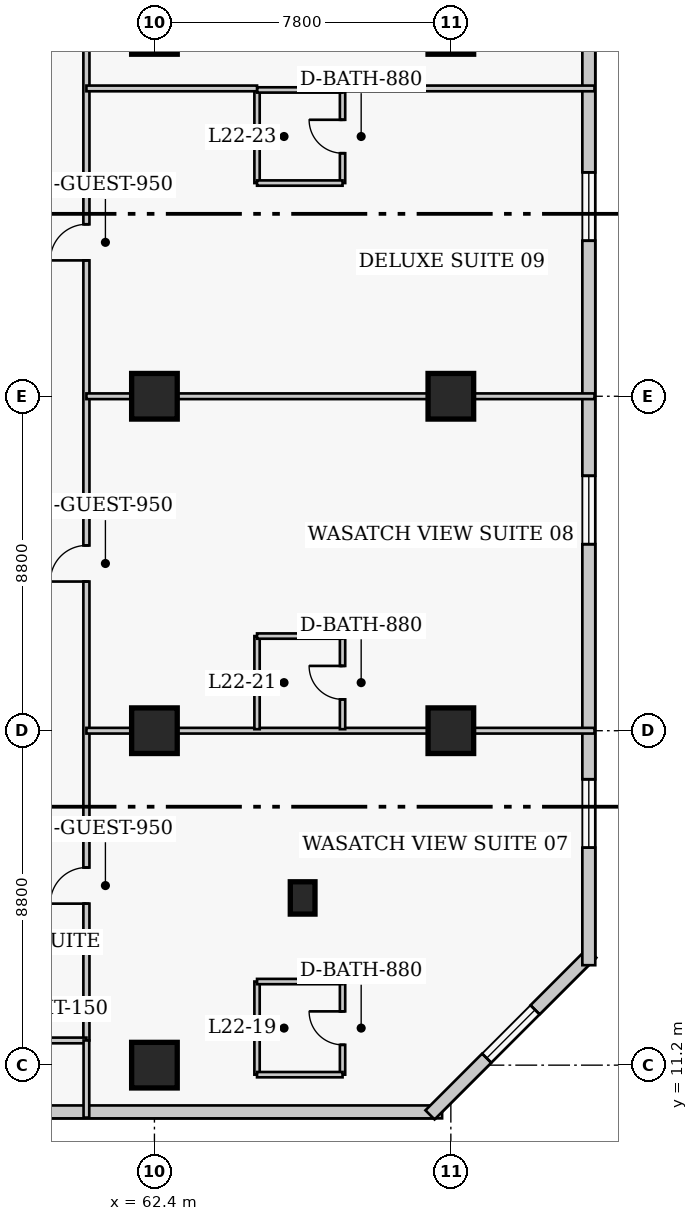
"""IFC4 building model, lengths in metres.
Left out: names, types, materials, properties, quantities, classifications, styles, units other than length and angle.
Written with IfcOpenShell. Run it as: python <this file> out.ifc"""

import sys

from ifc_helpers import new_model, si_unit, direction, frame, frame_2d, origin, origin_2d, place, context, subcontext, project, spatial, rectangle, extrude, element, fill, save


model = new_model("IFC4")
c1 = context("Model", 3, precision=1e-05, world=origin(), true_north=direction((0.0, 1.0)))
c2 = subcontext(c1, "Body", "Model", "MODEL_VIEW")
j1 = project(units=[si_unit("LENGTHUNIT", "METRE"), si_unit("PLANEANGLEUNIT", "RADIAN")], contexts=[c1])
p1 = place(None, origin())
s1 = spatial("IfcSite", under=j1, at=p1, CompositionType="ELEMENT")
p2 = place(p1, origin())
s2 = spatial("IfcBuilding", under=s1, at=p2, CompositionType="ELEMENT")
p3 = place(p2, frame((0.0, 0.0, 91.8)))
s3 = spatial("IfcBuildingStorey", under=s2, at=p3, CompositionType="ELEMENT", Elevation=91.8)
for number, where, z_axis, x_axis in (
    (1, (62.4, 11.2, 0.0), (0.0, 0.0, 1.0), (1.0, 0.0, 0.0)),
    (2, (62.4, 20.0, 0.0), (0.0, 0.0, 1.0), (1.0, 0.0, 0.0)),
    (3, (62.4, 28.8, 0.0), (0.0, 0.0, 1.0), (1.0, 0.0, 0.0)),
    (4, (62.4, 38.4, 0.0), (0.0, 0.0, 1.0), (1.0, 0.0, 0.0)),
    (5, (70.2, 20.0, 0.0), (0.0, 0.0, 1.0), (1.0, 0.0, 0.0)),
    (6, (70.2, 28.8, 0.0), (0.0, 0.0, 1.0), (1.0, 0.0, 0.0)),
    (7, (70.2, 38.4, 0.0), (0.0, 0.0, 1.0), (1.0, 0.0, 0.0)),
):
    element("IfcColumn", number, at=place(p3, frame(where, z_axis=z_axis, x_axis=x_axis)), inside=s3, PredefinedType="COLUMN", context=c2, shape_type="SweptSolid", body=[
        extrude(rectangle(XDim=1.2, YDim=1.2, at=origin_2d()), origin(), (0.0, 0.0, 1.0), 3.8),
    ])
p4 = place(p3, frame((66.3, 15.6, 0.0), z_axis=(0.0, 0.0, 1.0), x_axis=(1.0, 0.0, 0.0)))
e8 = element("IfcColumn", 8, at=p4, inside=s3, PredefinedType="PILASTER", context=c2, shape_type="SweptSolid", body=[
    extrude(rectangle(XDim=0.65, YDim=0.85, at=origin_2d()), origin(), (0.0, 0.0, 1.0), 3.8),
])
p5 = place(p3, frame((41.68, 9.97, 0.0), z_axis=(0.0, 0.0, 1.0), x_axis=(1.0, 0.0, 0.0)))
e9 = element("IfcWall", 9, at=p5, inside=s3, PredefinedType="SOLIDWALL", context=c2, shape_type="SweptSolid", body=[
    extrude(rectangle(XDim=28.29, YDim=0.34, at=frame_2d((14.145, 0.0))), origin(), (0.0, 0.0, 1.0), 3.54),
])
p6 = place(p5, frame((7.57, 0.0, 0.0)))
e10 = element("IfcOpeningElement", 10, at=p6, cuts=e9, PredefinedType="OPENING", context=c2, shape_type="SweptSolid", body=[
    extrude(rectangle(XDim=1.4, YDim=2.15, at=frame_2d((0.7, 1.075))), frame((0.0, 0.18, 0.0), z_axis=(0.0, -1.0, 0.0), x_axis=(1.0, 0.0, 0.0)), (0.0, 0.0, 1.0), 0.36),
])
p7 = place(p5, frame((2.665, 0.0, 0.85)))
e11 = element("IfcOpeningElement", 11, at=p7, cuts=e9, PredefinedType="OPENING", context=c2, shape_type="SweptSolid", body=[
    extrude(rectangle(XDim=1.8, YDim=1.8, at=frame_2d((0.9, 0.9))), frame((0.0, 0.18, 0.0), z_axis=(0.0, -1.0, 0.0), x_axis=(1.0, 0.0, 0.0)), (0.0, 0.0, 1.0), 0.36),
])
p8 = place(p5, frame((13.895, 0.0, 0.85)))
e12 = element("IfcOpeningElement", 12, at=p8, cuts=e9, PredefinedType="OPENING", context=c2, shape_type="SweptSolid", body=[
    extrude(rectangle(XDim=1.8, YDim=1.8, at=frame_2d((0.9, 0.9))), frame((0.0, 0.18, 0.0), z_axis=(0.0, -1.0, 0.0), x_axis=(1.0, 0.0, 0.0)), (0.0, 0.0, 1.0), 0.36),
])
p9 = place(p3, frame((69.652, 9.892, 0.0), z_axis=(0.0, 0.0, 1.0), x_axis=(0.707106781187, 0.707106781187, 0.0)))
e13 = element("IfcWall", 13, at=p9, inside=s3, PredefinedType="SOLIDWALL", context=c2, shape_type="SweptSolid", body=[
    extrude(rectangle(XDim=6.02, YDim=0.34, at=frame_2d((3.01, 0.0))), origin(), (0.0, 0.0, 1.0), 3.54),
])
p10 = place(p9, frame((2.11, 0.0, 0.85)))
e14 = element("IfcOpeningElement", 14, at=p10, cuts=e13, PredefinedType="OPENING", context=c2, shape_type="SweptSolid", body=[
    extrude(rectangle(XDim=1.8, YDim=1.8, at=frame_2d((0.9, 0.9))), frame((0.0, 0.18, 0.0), z_axis=(0.0, -1.0, 0.0), x_axis=(1.0, 0.0, 0.0)), (0.0, 0.0, 1.0), 0.36),
])
p11 = place(p3, frame((73.83, 13.83, 0.0), z_axis=(0.0, 0.0, 1.0), x_axis=(0.0, 1.0, 0.0)))
e15 = element("IfcWall", 15, at=p11, inside=s3, PredefinedType="SOLIDWALL", context=c2, shape_type="SweptSolid", body=[
    extrude(rectangle(XDim=31.94, YDim=0.34, at=frame_2d((15.97, 0.0))), origin(), (0.0, 0.0, 1.0), 3.54),
])
p12 = place(p11, frame((3.093, 0.0, 0.85)))
e16 = element("IfcOpeningElement", 16, at=p12, cuts=e15, PredefinedType="OPENING", context=c2, shape_type="SweptSolid", body=[
    extrude(rectangle(XDim=1.8, YDim=1.8, at=frame_2d((0.9, 0.9))), frame((0.0, 0.18, 0.0), z_axis=(0.0, -1.0, 0.0), x_axis=(1.0, 0.0, 0.0)), (0.0, 0.0, 1.0), 0.36),
])
p13 = place(p11, frame((11.077, 0.0, 0.85)))
e17 = element("IfcOpeningElement", 17, at=p13, cuts=e15, PredefinedType="OPENING", context=c2, shape_type="SweptSolid", body=[
    extrude(rectangle(XDim=1.8, YDim=1.8, at=frame_2d((0.9, 0.9))), frame((0.0, 0.18, 0.0), z_axis=(0.0, -1.0, 0.0), x_axis=(1.0, 0.0, 0.0)), (0.0, 0.0, 1.0), 0.36),
])
p14 = place(p11, frame((19.062, 0.0, 0.85)))
e18 = element("IfcOpeningElement", 18, at=p14, cuts=e15, PredefinedType="OPENING", context=c2, shape_type="SweptSolid", body=[
    extrude(rectangle(XDim=1.8, YDim=1.8, at=frame_2d((0.9, 0.9))), frame((0.0, 0.18, 0.0), z_axis=(0.0, -1.0, 0.0), x_axis=(1.0, 0.0, 0.0)), (0.0, 0.0, 1.0), 0.36),
])
p15 = place(p11, frame((27.048, 0.0, 0.85)))
e19 = element("IfcOpeningElement", 19, at=p15, cuts=e15, PredefinedType="OPENING", context=c2, shape_type="SweptSolid", body=[
    extrude(rectangle(XDim=1.8, YDim=1.8, at=frame_2d((0.9, 0.9))), frame((0.0, 0.18, 0.0), z_axis=(0.0, -1.0, 0.0), x_axis=(1.0, 0.0, 0.0)), (0.0, 0.0, 1.0), 0.36),
])
p16 = place(p3, frame((60.61, 11.85, 0.0), z_axis=(0.0, 0.0, 1.0), x_axis=(0.0, 1.0, 0.0)))
e20 = element("IfcWall", 20, at=p16, inside=s3, PredefinedType="PARTITIONING", context=c2, shape_type="SweptSolid", body=[
    extrude(rectangle(XDim=28.8, YDim=0.16, at=frame_2d((14.4, 0.0))), origin(), (0.0, 0.0, 1.0), 3.54),
])
p17 = place(p16, frame((3.6, 0.0, 0.0)))
e21 = element("IfcOpeningElement", 21, at=p17, cuts=e20, PredefinedType="OPENING", context=c2, shape_type="SweptSolid", body=[
    extrude(rectangle(XDim=0.95, YDim=2.1, at=frame_2d((0.475, 1.05))), frame((0.0, 0.09, 0.0), z_axis=(0.0, -1.0, 0.0), x_axis=(1.0, 0.0, 0.0)), (0.0, 0.0, 1.0), 0.18),
])
p18 = place(p16, frame((12.075, 0.0, 0.0)))
e22 = element("IfcOpeningElement", 22, at=p18, cuts=e20, PredefinedType="OPENING", context=c2, shape_type="SweptSolid", body=[
    extrude(rectangle(XDim=0.95, YDim=2.1, at=frame_2d((0.475, 1.05))), frame((0.0, 0.09, 0.0), z_axis=(0.0, -1.0, 0.0), x_axis=(1.0, 0.0, 0.0)), (0.0, 0.0, 1.0), 0.18),
])
p19 = place(p16, frame((20.525, 0.0, 0.0)))
e23 = element("IfcOpeningElement", 23, at=p19, cuts=e20, PredefinedType="OPENING", context=c2, shape_type="SweptSolid", body=[
    extrude(rectangle(XDim=0.95, YDim=2.1, at=frame_2d((0.475, 1.05))), frame((0.0, 0.09, 0.0), z_axis=(0.0, -1.0, 0.0), x_axis=(1.0, 0.0, 0.0)), (0.0, 0.0, 1.0), 0.18),
])
p20 = place(p16, frame((27.36, 0.0, 0.0)))
e24 = element("IfcOpeningElement", 24, at=p20, cuts=e20, PredefinedType="OPENING", context=c2, shape_type="SweptSolid", body=[
    extrude(rectangle(XDim=1.0, YDim=2.15, at=frame_2d((0.5, 1.075))), frame((0.0, 0.09, 0.0), z_axis=(0.0, -1.0, 0.0), x_axis=(1.0, 0.0, 0.0)), (0.0, 0.0, 1.0), 0.18),
])
p21 = place(p3, frame((58.39, 11.85, 0.0), z_axis=(0.0, 0.0, 1.0), x_axis=(1.0, 0.0, 0.0)))
e25 = element("IfcWall", 25, at=p21, inside=s3, PredefinedType="PARTITIONING", context=c2, shape_type="SweptSolid", body=[
    extrude(rectangle(XDim=2.22, YDim=0.15, at=frame_2d((1.11, 0.0))), origin(), (0.0, 0.0, 1.0), 3.54),
])
p22 = place(p3, frame((60.61, 9.82, 0.0), z_axis=(0.0, 0.0, 1.0), x_axis=(0.0, 1.0, 0.0)))
e26 = element("IfcWall", 26, at=p22, inside=s3, PredefinedType="PARTITIONING", context=c2, shape_type="SweptSolid", body=[
    extrude(rectangle(XDim=2.03, YDim=0.15, at=frame_2d((1.015, 0.0))), origin(), (0.0, 0.0, 1.0), 3.54),
])
p23 = place(p3, frame((65.1, 10.95, 0.0), z_axis=(0.0, 0.0, 1.0), x_axis=(0.0, 1.0, 0.0)))
e27 = element("IfcWall", 27, at=p23, inside=s3, PredefinedType="PLUMBINGWALL", context=c2, shape_type="SweptSolid", body=[
    extrude(rectangle(XDim=2.45, YDim=0.14, at=frame_2d((1.225, 0.0))), origin(), (0.0, 0.0, 1.0), 3.54),
])
p24 = place(p3, frame((67.35, 10.95, 0.0), z_axis=(0.0, 0.0, 1.0), x_axis=(0.0, 1.0, 0.0)))
e28 = element("IfcWall", 28, at=p24, inside=s3, PredefinedType="PLUMBINGWALL", context=c2, shape_type="SweptSolid", body=[
    extrude(rectangle(XDim=2.45, YDim=0.14, at=frame_2d((1.225, 0.0))), origin(), (0.0, 0.0, 1.0), 3.54),
])
p25 = place(p24, frame((0.785, 0.0, 0.0)))
e29 = element("IfcOpeningElement", 29, at=p25, cuts=e28, PredefinedType="OPENING", context=c2, shape_type="SweptSolid", body=[
    extrude(rectangle(XDim=0.88, YDim=2.05, at=frame_2d((0.44, 1.025))), frame((0.0, 0.08, 0.0), z_axis=(0.0, -1.0, 0.0), x_axis=(1.0, 0.0, 0.0)), (0.0, 0.0, 1.0), 0.16),
])
for number, where, z_axis, x_axis in (
    (30, (65.1, 10.95, 0.0), (0.0, 0.0, 1.0), (1.0, 0.0, 0.0)),
    (31, (65.1, 13.4, 0.0), (0.0, 0.0, 1.0), (1.0, 0.0, 0.0)),
):
    element("IfcWall", number, at=place(p3, frame(where, z_axis=z_axis, x_axis=x_axis)), inside=s3, PredefinedType="PLUMBINGWALL", context=c2, shape_type="SweptSolid", body=[
        extrude(rectangle(XDim=2.25, YDim=0.14, at=frame_2d((1.125, 0.0))), origin(), (0.0, 0.0, 1.0), 3.54),
    ])
p26 = place(p3, frame((60.61, 20.0, 0.0), z_axis=(0.0, 0.0, 1.0), x_axis=(1.0, 0.0, 0.0)))
e32 = element("IfcWall", 32, at=p26, inside=s3, PredefinedType="PARTITIONING", context=c2, shape_type="SweptSolid", body=[
    extrude(rectangle(XDim=13.37, YDim=0.15, at=frame_2d((6.685, 0.0))), origin(), (0.0, 0.0, 1.0), 2.679),
])
p27 = place(p3, frame((65.1, 20.04, 0.0), z_axis=(0.0, 0.0, 1.0), x_axis=(0.0, 1.0, 0.0)))
e33 = element("IfcWall", 33, at=p27, inside=s3, PredefinedType="PLUMBINGWALL", context=c2, shape_type="SweptSolid", body=[
    extrude(rectangle(XDim=2.45, YDim=0.14, at=frame_2d((1.225, 0.0))), origin(), (0.0, 0.0, 1.0), 3.54),
])
p28 = place(p3, frame((67.35, 20.04, 0.0), z_axis=(0.0, 0.0, 1.0), x_axis=(0.0, 1.0, 0.0)))
e34 = element("IfcWall", 34, at=p28, inside=s3, PredefinedType="PLUMBINGWALL", context=c2, shape_type="SweptSolid", body=[
    extrude(rectangle(XDim=2.45, YDim=0.14, at=frame_2d((1.225, 0.0))), origin(), (0.0, 0.0, 1.0), 3.54),
])
p29 = place(p28, frame((0.785, 0.0, 0.0)))
e35 = element("IfcOpeningElement", 35, at=p29, cuts=e34, PredefinedType="OPENING", context=c2, shape_type="SweptSolid", body=[
    extrude(rectangle(XDim=0.88, YDim=2.05, at=frame_2d((0.44, 1.025))), frame((0.0, 0.08, 0.0), z_axis=(0.0, -1.0, 0.0), x_axis=(1.0, 0.0, 0.0)), (0.0, 0.0, 1.0), 0.16),
])
p30 = place(p3, frame((65.1, 22.49, 0.0), z_axis=(0.0, 0.0, 1.0), x_axis=(1.0, 0.0, 0.0)))
e36 = element("IfcWall", 36, at=p30, inside=s3, PredefinedType="PLUMBINGWALL", context=c2, shape_type="SweptSolid", body=[
    extrude(rectangle(XDim=2.25, YDim=0.14, at=frame_2d((1.125, 0.0))), origin(), (0.0, 0.0, 1.0), 3.54),
])
p31 = place(p3, frame((60.61, 28.8, 0.0), z_axis=(0.0, 0.0, 1.0), x_axis=(1.0, 0.0, 0.0)))
e37 = element("IfcWall", 37, at=p31, inside=s3, PredefinedType="PARTITIONING", context=c2, shape_type="SweptSolid", body=[
    extrude(rectangle(XDim=13.37, YDim=0.15, at=frame_2d((6.685, 0.0))), origin(), (0.0, 0.0, 1.0), 2.679),
])
p32 = place(p3, frame((65.1, 34.41, 0.0), z_axis=(0.0, 0.0, 1.0), x_axis=(0.0, 1.0, 0.0)))
e38 = element("IfcWall", 38, at=p32, inside=s3, PredefinedType="PLUMBINGWALL", context=c2, shape_type="SweptSolid", body=[
    extrude(rectangle(XDim=2.45, YDim=0.14, at=frame_2d((1.225, 0.0))), origin(), (0.0, 0.0, 1.0), 3.54),
])
p33 = place(p3, frame((67.35, 34.41, 0.0), z_axis=(0.0, 0.0, 1.0), x_axis=(0.0, 1.0, 0.0)))
e39 = element("IfcWall", 39, at=p33, inside=s3, PredefinedType="PLUMBINGWALL", context=c2, shape_type="SweptSolid", body=[
    extrude(rectangle(XDim=2.45, YDim=0.14, at=frame_2d((1.225, 0.0))), origin(), (0.0, 0.0, 1.0), 3.54),
])
p34 = place(p33, frame((0.785, 0.0, 0.0)))
e40 = element("IfcOpeningElement", 40, at=p34, cuts=e39, PredefinedType="OPENING", context=c2, shape_type="SweptSolid", body=[
    extrude(rectangle(XDim=0.88, YDim=2.05, at=frame_2d((0.44, 1.025))), frame((0.0, 0.08, 0.0), z_axis=(0.0, -1.0, 0.0), x_axis=(1.0, 0.0, 0.0)), (0.0, 0.0, 1.0), 0.16),
])
for number, where, z_axis, x_axis in (
    (41, (65.1, 34.41, 0.0), (0.0, 0.0, 1.0), (1.0, 0.0, 0.0)),
    (42, (65.1, 36.86, 0.0), (0.0, 0.0, 1.0), (1.0, 0.0, 0.0)),
):
    element("IfcWall", number, at=place(p3, frame(where, z_axis=z_axis, x_axis=x_axis)), inside=s3, PredefinedType="PLUMBINGWALL", context=c2, shape_type="SweptSolid", body=[
        extrude(rectangle(XDim=2.25, YDim=0.14, at=frame_2d((1.125, 0.0))), origin(), (0.0, 0.0, 1.0), 3.54),
    ])
p35 = place(p3, frame((60.61, 36.9, 0.0), z_axis=(0.0, 0.0, 1.0), x_axis=(1.0, 0.0, 0.0)))
e43 = element("IfcWall", 43, at=p35, inside=s3, PredefinedType="PARTITIONING", context=c2, shape_type="SweptSolid", body=[
    extrude(rectangle(XDim=4.49, YDim=0.15, at=frame_2d((2.245, 0.0))), origin(), (0.0, 0.0, 1.0), 3.54),
])
p36 = place(p3, frame((67.35, 36.9, 0.0), z_axis=(0.0, 0.0, 1.0), x_axis=(1.0, 0.0, 0.0)))
e44 = element("IfcWall", 44, at=p36, inside=s3, PredefinedType="PARTITIONING", context=c2, shape_type="SweptSolid", body=[
    extrude(rectangle(XDim=6.63, YDim=0.15, at=frame_2d((3.315, 0.0))), origin(), (0.0, 0.0, 1.0), 3.54),
])
p37 = place(p10, origin())
e45 = element("IfcWindow", 45, at=p37, inside=s3, PartitioningType="SINGLE_PANEL", PredefinedType="WINDOW", context=c2, shape_type="SweptSolid", body=[
    extrude(rectangle(XDim=1.8, YDim=1.8, at=frame_2d((0.9, 0.9))), frame((0.0, 0.03, 0.0), z_axis=(0.0, -1.0, 0.0), x_axis=(1.0, 0.0, 0.0)), (0.0, 0.0, 1.0), 0.06),
])
fill(e14, e45)
p38 = place(p12, origin())
e46 = element("IfcWindow", 46, at=p38, inside=s3, PartitioningType="SINGLE_PANEL", PredefinedType="WINDOW", context=c2, shape_type="SweptSolid", body=[
    extrude(rectangle(XDim=1.8, YDim=1.8, at=frame_2d((0.9, 0.9))), frame((0.0, 0.03, 0.0), z_axis=(0.0, -1.0, 0.0), x_axis=(1.0, 0.0, 0.0)), (0.0, 0.0, 1.0), 0.06),
])
fill(e16, e46)
p39 = place(p13, origin())
e47 = element("IfcWindow", 47, at=p39, inside=s3, PartitioningType="SINGLE_PANEL", PredefinedType="WINDOW", context=c2, shape_type="SweptSolid", body=[
    extrude(rectangle(XDim=1.8, YDim=1.8, at=frame_2d((0.9, 0.9))), frame((0.0, 0.03, 0.0), z_axis=(0.0, -1.0, 0.0), x_axis=(1.0, 0.0, 0.0)), (0.0, 0.0, 1.0), 0.06),
])
fill(e17, e47)
p40 = place(p14, origin())
e48 = element("IfcWindow", 48, at=p40, inside=s3, PartitioningType="SINGLE_PANEL", PredefinedType="WINDOW", context=c2, shape_type="SweptSolid", body=[
    extrude(rectangle(XDim=1.8, YDim=1.8, at=frame_2d((0.9, 0.9))), frame((0.0, 0.03, 0.0), z_axis=(0.0, -1.0, 0.0), x_axis=(1.0, 0.0, 0.0)), (0.0, 0.0, 1.0), 0.06),
])
fill(e18, e48)
p41 = place(p25, origin())
e49 = element("IfcDoor", 49, at=p41, inside=s3, OperationType="SINGLE_SWING_RIGHT", PredefinedType="DOOR", context=c2, shape_type="SweptSolid", body=[
    extrude(rectangle(XDim=0.88, YDim=2.05, at=frame_2d((0.44, 1.025))), frame((0.0, 0.025, 0.0), z_axis=(0.0, -1.0, 0.0), x_axis=(1.0, 0.0, 0.0)), (0.0, 0.0, 1.0), 0.05),
])
fill(e29, e49)
p42 = place(p17, origin())
e50 = element("IfcDoor", 50, at=p42, inside=s3, OperationType="SINGLE_SWING_LEFT", PredefinedType="DOOR", context=c2, shape_type="SweptSolid", body=[
    extrude(rectangle(XDim=0.95, YDim=2.1, at=frame_2d((0.475, 1.05))), frame((0.0, 0.025, 0.0), z_axis=(0.0, -1.0, 0.0), x_axis=(1.0, 0.0, 0.0)), (0.0, 0.0, 1.0), 0.05),
])
fill(e21, e50)
p43 = place(p29, origin())
e51 = element("IfcDoor", 51, at=p43, inside=s3, OperationType="SINGLE_SWING_RIGHT", PredefinedType="DOOR", context=c2, shape_type="SweptSolid", body=[
    extrude(rectangle(XDim=0.88, YDim=2.05, at=frame_2d((0.44, 1.025))), frame((0.0, 0.025, 0.0), z_axis=(0.0, -1.0, 0.0), x_axis=(1.0, 0.0, 0.0)), (0.0, 0.0, 1.0), 0.05),
])
fill(e35, e51)
p44 = place(p18, origin())
e52 = element("IfcDoor", 52, at=p44, inside=s3, OperationType="SINGLE_SWING_LEFT", PredefinedType="DOOR", context=c2, shape_type="SweptSolid", body=[
    extrude(rectangle(XDim=0.95, YDim=2.1, at=frame_2d((0.475, 1.05))), frame((0.0, 0.025, 0.0), z_axis=(0.0, -1.0, 0.0), x_axis=(1.0, 0.0, 0.0)), (0.0, 0.0, 1.0), 0.05),
])
fill(e22, e52)
p45 = place(p34, origin())
e53 = element("IfcDoor", 53, at=p45, inside=s3, OperationType="SINGLE_SWING_RIGHT", PredefinedType="DOOR", context=c2, shape_type="SweptSolid", body=[
    extrude(rectangle(XDim=0.88, YDim=2.05, at=frame_2d((0.44, 1.025))), frame((0.0, 0.025, 0.0), z_axis=(0.0, -1.0, 0.0), x_axis=(1.0, 0.0, 0.0)), (0.0, 0.0, 1.0), 0.05),
])
fill(e40, e53)
p46 = place(p19, origin())
e54 = element("IfcDoor", 54, at=p46, inside=s3, OperationType="SINGLE_SWING_LEFT", PredefinedType="DOOR", context=c2, shape_type="SweptSolid", body=[
    extrude(rectangle(XDim=0.95, YDim=2.1, at=frame_2d((0.475, 1.05))), frame((0.0, 0.025, 0.0), z_axis=(0.0, -1.0, 0.0), x_axis=(1.0, 0.0, 0.0)), (0.0, 0.0, 1.0), 0.05),
])
fill(e23, e54)
save(model, sys.argv[1])
